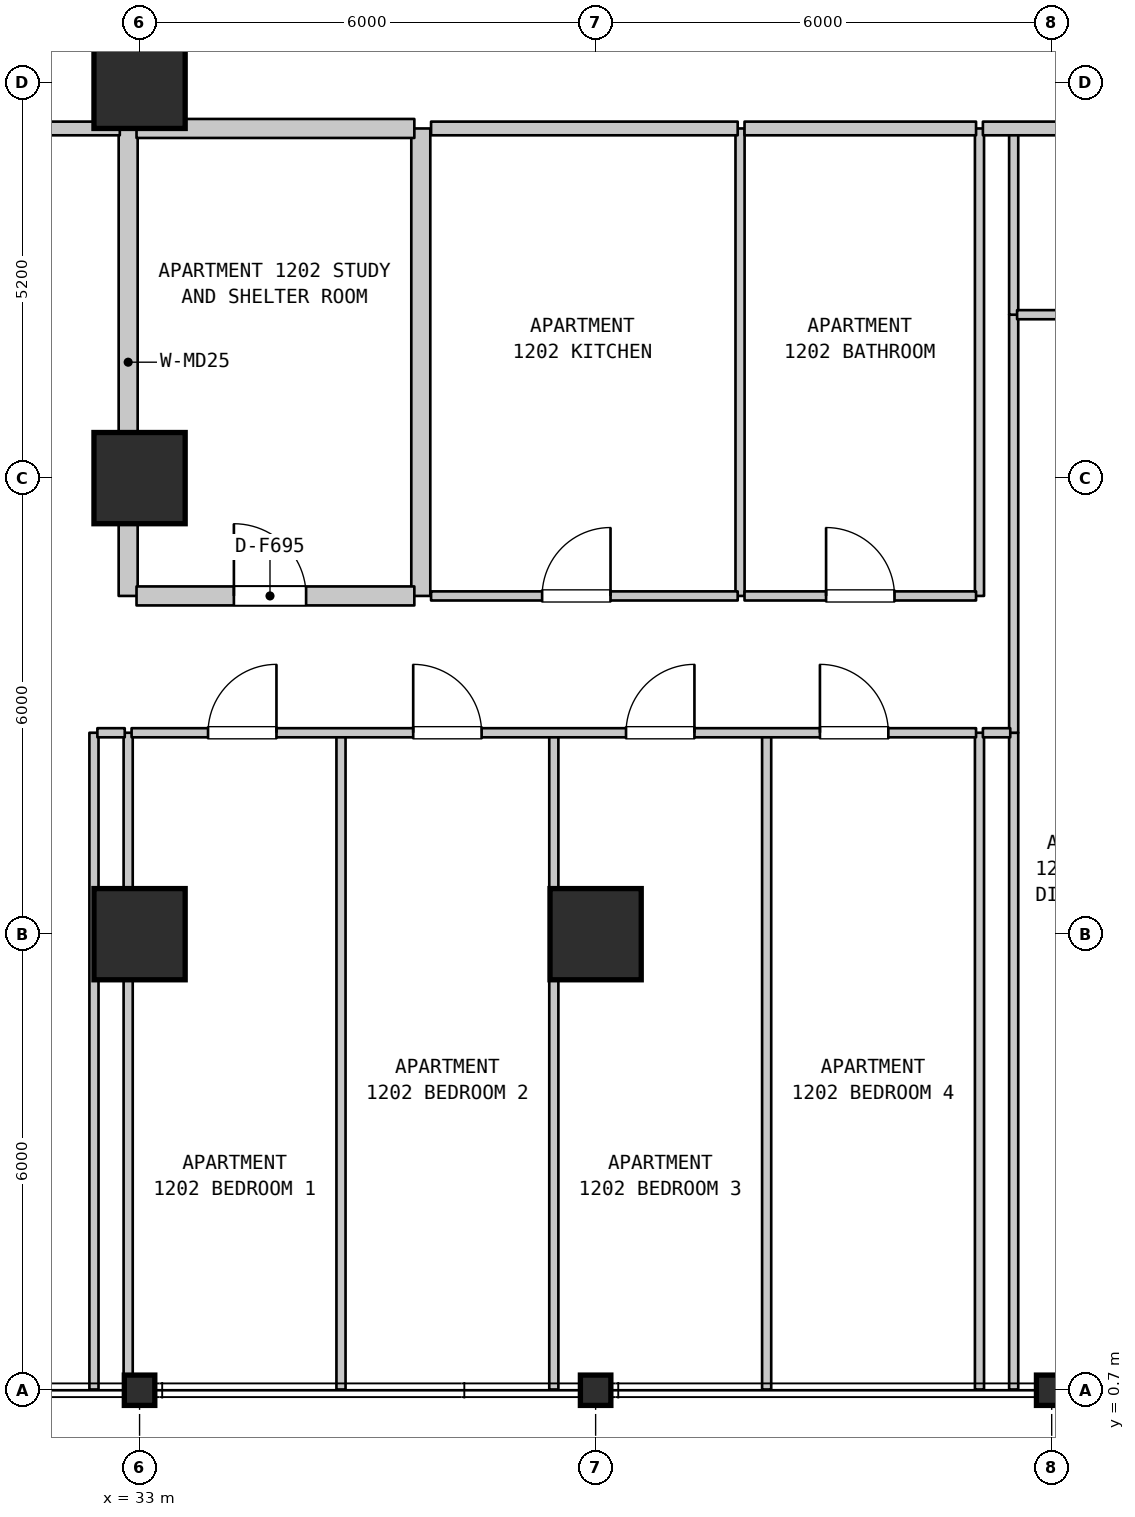
"""IFC4 building model, lengths in metres.
Left out: names, types, materials, properties, quantities, classifications, styles, units other than length and angle.
Written with IfcOpenShell. Run it as: python <this file> out.ifc"""

import sys

from ifc_helpers import new_model, si_unit, direction, frame, frame_2d, origin, origin_2d, place, context, subcontext, project, spatial, rectangle, i_section, extrude, element, fill, save


model = new_model("IFC4")
c1 = context("Model", 3, precision=1e-05, world=origin(), true_north=direction((0.0, 1.0)))
c2 = subcontext(c1, "Body", "Model", "MODEL_VIEW")
j1 = project(units=[si_unit("LENGTHUNIT", "METRE"), si_unit("PLANEANGLEUNIT", "RADIAN")], contexts=[c1])
p1 = place(None, origin())
s1 = spatial("IfcSite", under=j1, at=p1, CompositionType="ELEMENT")
p2 = place(p1, origin())
s2 = spatial("IfcBuilding", under=s1, at=p2, CompositionType="ELEMENT")
p3 = place(p2, frame((0.0, 0.0, 53.6)))
s3 = spatial("IfcBuildingStorey", under=s2, at=p3, CompositionType="ELEMENT", Elevation=53.6)
p4 = place(p3, frame((33.0, 0.7, 0.0), z_axis=(0.0, 0.0, 1.0), x_axis=(1.0, 0.0, 0.0)))
e1 = element("IfcColumn", 1, at=p4, inside=s3, PredefinedType="COLUMN", context=c2, shape_type="SweptSolid", body=[
    extrude(i_section(OverallWidth=0.401, OverallDepth=0.399, WebThickness=0.025, FlangeThickness=0.04, FilletRadius=0.015, at=origin_2d()), origin(), (0.0, 0.0, 1.0), 3.7),
])
for number, where, z_axis, x_axis in (
    (2, (33.0, 6.7, 0.0), (0.0, 0.0, 1.0), (1.0, 0.0, 0.0)),
    (3, (33.0, 12.7, 0.0), (0.0, 0.0, 1.0), (1.0, 0.0, 0.0)),
    (4, (33.0, 17.9, 0.0), (0.0, 0.0, 1.0), (1.0, 0.0, 0.0)),
):
    element("IfcColumn", number, at=place(p3, frame(where, z_axis=z_axis, x_axis=x_axis)), inside=s3, PredefinedType="COLUMN", context=c2, shape_type="SweptSolid", body=[
        extrude(rectangle(XDim=1.2, YDim=1.2, at=origin_2d()), origin(), (0.0, 0.0, 1.0), 3.7),
    ])
p5 = place(p3, frame((39.0, 0.7, 0.0), z_axis=(0.0, 0.0, 1.0), x_axis=(1.0, 0.0, 0.0)))
e5 = element("IfcColumn", 5, at=p5, inside=s3, PredefinedType="COLUMN", context=c2, shape_type="SweptSolid", body=[
    extrude(i_section(OverallWidth=0.401, OverallDepth=0.399, WebThickness=0.025, FlangeThickness=0.04, FilletRadius=0.015, at=origin_2d()), origin(), (0.0, 0.0, 1.0), 3.7),
])
p6 = place(p3, frame((39.0, 6.7, 0.0), z_axis=(0.0, 0.0, 1.0), x_axis=(1.0, 0.0, 0.0)))
e6 = element("IfcColumn", 6, at=p6, inside=s3, PredefinedType="COLUMN", context=c2, shape_type="SweptSolid", body=[
    extrude(rectangle(XDim=1.2, YDim=1.2, at=origin_2d()), origin(), (0.0, 0.0, 1.0), 3.7),
])
p7 = place(p3, frame((45.0, 0.7, 0.0), z_axis=(0.0, 0.0, 1.0), x_axis=(1.0, 0.0, 0.0)))
e7 = element("IfcColumn", 7, at=p7, inside=s3, PredefinedType="COLUMN", context=c2, shape_type="SweptSolid", body=[
    extrude(i_section(OverallWidth=0.401, OverallDepth=0.399, WebThickness=0.025, FlangeThickness=0.04, FilletRadius=0.015, at=origin_2d()), origin(), (0.0, 0.0, 1.0), 3.7),
])
for number, where, z_axis, x_axis in (
    (8, (32.4, 0.71, 0.0), (0.0, 0.0, 1.0), (0.0, 1.0, 0.0)),
    (9, (32.85, 0.71, 0.0), (0.0, 0.0, 1.0), (0.0, 1.0, 0.0)),
):
    element("IfcWall", number, at=place(p3, frame(where, z_axis=z_axis, x_axis=x_axis)), inside=s3, PredefinedType="PARTITIONING", context=c2, shape_type="SweptSolid", body=[
        extrude(rectangle(XDim=8.64, YDim=0.12, at=frame_2d((4.32, 0.0))), origin(), (0.0, 0.0, 1.0), 3.385),
    ])
p8 = place(p3, frame((32.85, 11.15, 0.0), z_axis=(0.0, 0.0, 1.0), x_axis=(0.0, 1.0, 0.0)))
e10 = element("IfcWall", 10, at=p8, inside=s3, PredefinedType="STANDARD", context=c2, shape_type="SweptSolid", body=[
    extrude(rectangle(XDim=6.15, YDim=0.25, at=frame_2d((3.075, 0.0))), origin(), (0.0, 0.0, 1.0), 3.385),
])
p9 = place(p3, frame((35.65, 0.71, 0.0), z_axis=(0.0, 0.0, 1.0), x_axis=(0.0, 1.0, 0.0)))
e11 = element("IfcWall", 11, at=p9, inside=s3, PredefinedType="PARTITIONING", context=c2, shape_type="SweptSolid", body=[
    extrude(rectangle(XDim=8.64, YDim=0.12, at=frame_2d((4.32, 0.0))), origin(), (0.0, 0.0, 1.0), 3.385),
])
p10 = place(p3, frame((36.7, 11.15, 0.0), z_axis=(0.0, 0.0, 1.0), x_axis=(0.0, 1.0, 0.0)))
e12 = element("IfcWall", 12, at=p10, inside=s3, PredefinedType="STANDARD", context=c2, shape_type="SweptSolid", body=[
    extrude(rectangle(XDim=6.15, YDim=0.25, at=frame_2d((3.075, 0.0))), origin(), (0.0, 0.0, 1.0), 3.385),
])
p11 = place(p3, frame((38.45, 0.71, 0.0), z_axis=(0.0, 0.0, 1.0), x_axis=(0.0, 1.0, 0.0)))
e13 = element("IfcWall", 13, at=p11, inside=s3, PredefinedType="PARTITIONING", context=c2, shape_type="SweptSolid", body=[
    extrude(rectangle(XDim=8.64, YDim=0.12, at=frame_2d((4.32, 0.0))), origin(), (0.0, 0.0, 1.0), 3.385),
])
p12 = place(p3, frame((40.9, 11.15, 0.0), z_axis=(0.0, 0.0, 1.0), x_axis=(0.0, 1.0, 0.0)))
e14 = element("IfcWall", 14, at=p12, inside=s3, PredefinedType="PARTITIONING", context=c2, shape_type="SweptSolid", body=[
    extrude(rectangle(XDim=6.15, YDim=0.12, at=frame_2d((3.075, 0.0))), origin(), (0.0, 0.0, 1.0), 3.385),
])
for number, where, z_axis, x_axis in (
    (15, (41.25, 0.71, 0.0), (0.0, 0.0, 1.0), (0.0, 1.0, 0.0)),
    (16, (44.05, 0.71, 0.0), (0.0, 0.0, 1.0), (0.0, 1.0, 0.0)),
):
    element("IfcWall", number, at=place(p3, frame(where, z_axis=z_axis, x_axis=x_axis)), inside=s3, PredefinedType="PARTITIONING", context=c2, shape_type="SweptSolid", body=[
        extrude(rectangle(XDim=8.64, YDim=0.12, at=frame_2d((4.32, 0.0))), origin(), (0.0, 0.0, 1.0), 3.385),
    ])
p13 = place(p3, frame((44.05, 11.15, 0.0), z_axis=(0.0, 0.0, 1.0), x_axis=(0.0, 1.0, 0.0)))
e17 = element("IfcWall", 17, at=p13, inside=s3, PredefinedType="PARTITIONING", context=c2, shape_type="SweptSolid", body=[
    extrude(rectangle(XDim=6.15, YDim=0.12, at=frame_2d((3.075, 0.0))), origin(), (0.0, 0.0, 1.0), 3.385),
])
p14 = place(p3, frame((44.5, 0.71, 0.0), z_axis=(0.0, 0.0, 1.0), x_axis=(0.0, 1.0, 0.0)))
e18 = element("IfcWall", 18, at=p14, inside=s3, PredefinedType="PARTITIONING", context=c2, shape_type="SweptSolid", body=[
    extrude(rectangle(XDim=8.64, YDim=0.12, at=frame_2d((4.32, 0.0))), origin(), (0.0, 0.0, 1.0), 3.385),
])
p15 = place(p3, frame((44.5, 9.35, 0.0), z_axis=(0.0, 0.0, 1.0), x_axis=(0.0, 1.0, 0.0)))
e19 = element("IfcWall", 19, at=p15, inside=s3, PredefinedType="PARTITIONING", context=c2, shape_type="SweptSolid", body=[
    extrude(rectangle(XDim=5.5, YDim=0.12, at=frame_2d((2.75, 0.0))), origin(), (0.0, 0.0, 1.0), 3.385),
])
p16 = place(p3, frame((44.5, 14.85, 0.0), z_axis=(0.0, 0.0, 1.0), x_axis=(0.0, 1.0, 0.0)))
e20 = element("IfcWall", 20, at=p16, inside=s3, PredefinedType="PARTITIONING", context=c2, shape_type="SweptSolid", body=[
    extrude(rectangle(XDim=2.45, YDim=0.12, at=frame_2d((1.225, 0.0))), origin(), (0.0, 0.0, 1.0), 3.385),
])
p17 = place(p3, frame((32.445, 9.35, 0.0), z_axis=(0.0, 0.0, 1.0), x_axis=(1.0, 0.0, 0.0)))
e21 = element("IfcWall", 21, at=p17, inside=s3, PredefinedType="PARTITIONING", context=c2, shape_type="SweptSolid", body=[
    extrude(rectangle(XDim=0.36, YDim=0.12, at=frame_2d((0.18, 0.0))), origin(), (0.0, 0.0, 1.0), 3.385),
])
p18 = place(p3, frame((32.895, 9.35, 0.0), z_axis=(0.0, 0.0, 1.0), x_axis=(1.0, 0.0, 0.0)))
e22 = element("IfcWall", 22, at=p18, inside=s3, PredefinedType="PARTITIONING", context=c2, shape_type="SweptSolid", body=[
    extrude(rectangle(XDim=11.11, YDim=0.12, at=frame_2d((5.555, 0.0))), origin(), (0.0, 0.0, 1.0), 3.385),
])
p19 = place(p18, frame((1.006, 0.0, 0.0)))
e23 = element("IfcOpeningElement", 23, at=p19, cuts=e22, PredefinedType="OPENING", context=c2, shape_type="SweptSolid", body=[
    extrude(rectangle(XDim=0.9, YDim=2.15, at=frame_2d((0.45, 1.075))), frame((0.0, 0.07, 0.0), z_axis=(0.0, -1.0, 0.0), x_axis=(1.0, 0.0, 0.0)), (0.0, 0.0, 1.0), 0.14),
])
p20 = place(p18, frame((3.705, 0.0, 0.0)))
e24 = element("IfcOpeningElement", 24, at=p20, cuts=e22, PredefinedType="OPENING", context=c2, shape_type="SweptSolid", body=[
    extrude(rectangle(XDim=0.9, YDim=2.15, at=frame_2d((0.45, 1.075))), frame((0.0, 0.07, 0.0), z_axis=(0.0, -1.0, 0.0), x_axis=(1.0, 0.0, 0.0)), (0.0, 0.0, 1.0), 0.14),
])
p21 = place(p18, frame((6.505, 0.0, 0.0)))
e25 = element("IfcOpeningElement", 25, at=p21, cuts=e22, PredefinedType="OPENING", context=c2, shape_type="SweptSolid", body=[
    extrude(rectangle(XDim=0.9, YDim=2.15, at=frame_2d((0.45, 1.075))), frame((0.0, 0.07, 0.0), z_axis=(0.0, -1.0, 0.0), x_axis=(1.0, 0.0, 0.0)), (0.0, 0.0, 1.0), 0.14),
])
p22 = place(p18, frame((9.056, 0.0, 0.0)))
e26 = element("IfcOpeningElement", 26, at=p22, cuts=e22, PredefinedType="OPENING", context=c2, shape_type="SweptSolid", body=[
    extrude(rectangle(XDim=0.9, YDim=2.15, at=frame_2d((0.45, 1.075))), frame((0.0, 0.07, 0.0), z_axis=(0.0, -1.0, 0.0), x_axis=(1.0, 0.0, 0.0)), (0.0, 0.0, 1.0), 0.14),
])
p23 = place(p3, frame((44.095, 9.35, 0.0), z_axis=(0.0, 0.0, 1.0), x_axis=(1.0, 0.0, 0.0)))
e27 = element("IfcWall", 27, at=p23, inside=s3, PredefinedType="PARTITIONING", context=c2, shape_type="SweptSolid", body=[
    extrude(rectangle(XDim=0.36, YDim=0.12, at=frame_2d((0.18, 0.0))), origin(), (0.0, 0.0, 1.0), 3.385),
])
p24 = place(p3, frame((32.96, 11.15, 0.0), z_axis=(0.0, 0.0, 1.0), x_axis=(1.0, 0.0, 0.0)))
e28 = element("IfcWall", 28, at=p24, inside=s3, PredefinedType="STANDARD", context=c2, shape_type="SweptSolid", body=[
    extrude(rectangle(XDim=3.655, YDim=0.25, at=frame_2d((1.828, 0.0))), origin(), (0.0, 0.0, 1.0), 3.385),
])
p25 = place(p24, frame((1.281, 0.0, 0.0)))
e29 = element("IfcOpeningElement", 29, at=p25, cuts=e28, PredefinedType="OPENING", context=c2, shape_type="SweptSolid", body=[
    extrude(rectangle(XDim=0.95, YDim=2.15, at=frame_2d((0.475, 1.075))), frame((0.0, 0.135, 0.0), z_axis=(0.0, -1.0, 0.0), x_axis=(1.0, 0.0, 0.0)), (0.0, 0.0, 1.0), 0.27),
])
p26 = place(p3, frame((36.835, 11.15, 0.0), z_axis=(0.0, 0.0, 1.0), x_axis=(1.0, 0.0, 0.0)))
e30 = element("IfcWall", 30, at=p26, inside=s3, PredefinedType="PARTITIONING", context=c2, shape_type="SweptSolid", body=[
    extrude(rectangle(XDim=4.034, YDim=0.12, at=frame_2d((2.017, 0.0))), origin(), (0.0, 0.0, 1.0), 3.385),
])
p27 = place(p26, frame((1.461, 0.0, 0.0)))
e31 = element("IfcOpeningElement", 31, at=p27, cuts=e30, PredefinedType="OPENING", context=c2, shape_type="SweptSolid", body=[
    extrude(rectangle(XDim=0.9, YDim=2.15, at=frame_2d((0.45, 1.075))), frame((0.0, 0.07, 0.0), z_axis=(0.0, -1.0, 0.0), x_axis=(1.0, 0.0, 0.0)), (0.0, 0.0, 1.0), 0.14),
])
p28 = place(p3, frame((40.959, 11.15, 0.0), z_axis=(0.0, 0.0, 1.0), x_axis=(1.0, 0.0, 0.0)))
e32 = element("IfcWall", 32, at=p28, inside=s3, PredefinedType="PARTITIONING", context=c2, shape_type="SweptSolid", body=[
    extrude(rectangle(XDim=3.046, YDim=0.12, at=frame_2d((1.523, 0.0))), origin(), (0.0, 0.0, 1.0), 3.385),
])
p29 = place(p28, frame((1.073, 0.0, 0.0)))
e33 = element("IfcOpeningElement", 33, at=p29, cuts=e32, PredefinedType="OPENING", context=c2, shape_type="SweptSolid", body=[
    extrude(rectangle(XDim=0.9, YDim=2.1, at=frame_2d((0.45, 1.05))), frame((0.0, 0.07, 0.0), z_axis=(0.0, -1.0, 0.0), x_axis=(1.0, 0.0, 0.0)), (0.0, 0.0, 1.0), 0.14),
])
p30 = place(p3, frame((44.545, 14.85, 0.0), z_axis=(0.0, 0.0, 1.0), x_axis=(1.0, 0.0, 0.0)))
e34 = element("IfcWall", 34, at=p30, inside=s3, PredefinedType="PARTITIONING", context=c2, shape_type="SweptSolid", body=[
    extrude(rectangle(XDim=2.16, YDim=0.12, at=frame_2d((1.08, 0.0))), origin(), (0.0, 0.0, 1.0), 3.385),
])
p31 = place(p30, frame((0.553, 0.0, 0.0)))
e35 = element("IfcOpeningElement", 35, at=p31, cuts=e34, PredefinedType="OPENING", context=c2, shape_type="SweptSolid", body=[
    extrude(rectangle(XDim=0.9, YDim=2.15, at=frame_2d((0.45, 1.075))), frame((0.0, 0.07, 0.0), z_axis=(0.0, -1.0, 0.0), x_axis=(1.0, 0.0, 0.0)), (0.0, 0.0, 1.0), 0.14),
])
p32 = place(p3, frame((27.645, 17.3, 0.0), z_axis=(0.0, 0.0, 1.0), x_axis=(1.0, 0.0, 0.0)))
e36 = element("IfcWall", 36, at=p32, inside=s3, PredefinedType="STANDARD", context=c2, shape_type="SweptSolid", body=[
    extrude(rectangle(XDim=5.095, YDim=0.18, at=frame_2d((2.547, 0.0))), origin(), (0.0, 0.0, 1.0), 3.385),
])
p33 = place(p32, frame((2.08, 0.0, 0.0)))
e37 = element("IfcOpeningElement", 37, at=p33, cuts=e36, PredefinedType="OPENING", context=c2, shape_type="SweptSolid", body=[
    extrude(rectangle(XDim=1.0, YDim=2.15, at=frame_2d((0.5, 1.075))), frame((0.0, 0.1, 0.0), z_axis=(0.0, -1.0, 0.0), x_axis=(1.0, 0.0, 0.0)), (0.0, 0.0, 1.0), 0.2),
])
p34 = place(p3, frame((32.96, 17.3, 0.0), z_axis=(0.0, 0.0, 1.0), x_axis=(1.0, 0.0, 0.0)))
e38 = element("IfcWall", 38, at=p34, inside=s3, PredefinedType="STANDARD", context=c2, shape_type="SweptSolid", body=[
    extrude(rectangle(XDim=3.655, YDim=0.25, at=frame_2d((1.828, 0.0))), origin(), (0.0, 0.0, 1.0), 3.385),
])
p35 = place(p3, frame((36.835, 17.3, 0.0), z_axis=(0.0, 0.0, 1.0), x_axis=(1.0, 0.0, 0.0)))
e39 = element("IfcWall", 39, at=p35, inside=s3, PredefinedType="STANDARD", context=c2, shape_type="SweptSolid", body=[
    extrude(rectangle(XDim=4.034, YDim=0.18, at=frame_2d((2.017, 0.0))), origin(), (0.0, 0.0, 1.0), 3.385),
])
p36 = place(p3, frame((40.959, 17.3, 0.0), z_axis=(0.0, 0.0, 1.0), x_axis=(1.0, 0.0, 0.0)))
e40 = element("IfcWall", 40, at=p36, inside=s3, PredefinedType="STANDARD", context=c2, shape_type="SweptSolid", body=[
    extrude(rectangle(XDim=3.046, YDim=0.18, at=frame_2d((1.523, 0.0))), origin(), (0.0, 0.0, 1.0), 3.385),
])
p37 = place(p3, frame((44.095, 17.3, 0.0), z_axis=(0.0, 0.0, 1.0), x_axis=(1.0, 0.0, 0.0)))
e41 = element("IfcWall", 41, at=p37, inside=s3, PredefinedType="STANDARD", context=c2, shape_type="SweptSolid", body=[
    extrude(rectangle(XDim=5.545, YDim=0.18, at=frame_2d((2.772, 0.0))), origin(), (0.0, 0.0, 1.0), 3.385),
])
p38 = place(p37, frame((2.305, 0.0, 0.0)))
e42 = element("IfcOpeningElement", 42, at=p38, cuts=e41, PredefinedType="OPENING", context=c2, shape_type="SweptSolid", body=[
    extrude(rectangle(XDim=1.0, YDim=2.15, at=frame_2d((0.5, 1.075))), frame((0.0, 0.1, 0.0), z_axis=(0.0, -1.0, 0.0), x_axis=(1.0, 0.0, 0.0)), (0.0, 0.0, 1.0), 0.2),
])
p39 = place(p19, origin())
e43 = element("IfcDoor", 43, at=p39, inside=s3, OperationType="SINGLE_SWING_RIGHT", PredefinedType="DOOR", context=c2, shape_type="SweptSolid", body=[
    extrude(rectangle(XDim=0.9, YDim=2.15, at=frame_2d((0.45, 1.075))), frame((0.0, 0.025, 0.0), z_axis=(0.0, -1.0, 0.0), x_axis=(1.0, 0.0, 0.0)), (0.0, 0.0, 1.0), 0.05),
])
fill(e23, e43)
p40 = place(p20, origin())
e44 = element("IfcDoor", 44, at=p40, inside=s3, OperationType="SINGLE_SWING_LEFT", PredefinedType="DOOR", context=c2, shape_type="SweptSolid", body=[
    extrude(rectangle(XDim=0.9, YDim=2.15, at=frame_2d((0.45, 1.075))), frame((0.0, 0.025, 0.0), z_axis=(0.0, -1.0, 0.0), x_axis=(1.0, 0.0, 0.0)), (0.0, 0.0, 1.0), 0.05),
])
fill(e24, e44)
p41 = place(p21, origin())
e45 = element("IfcDoor", 45, at=p41, inside=s3, OperationType="SINGLE_SWING_RIGHT", PredefinedType="DOOR", context=c2, shape_type="SweptSolid", body=[
    extrude(rectangle(XDim=0.9, YDim=2.15, at=frame_2d((0.45, 1.075))), frame((0.0, 0.025, 0.0), z_axis=(0.0, -1.0, 0.0), x_axis=(1.0, 0.0, 0.0)), (0.0, 0.0, 1.0), 0.05),
])
fill(e25, e45)
p42 = place(p22, origin())
e46 = element("IfcDoor", 46, at=p42, inside=s3, OperationType="SINGLE_SWING_LEFT", PredefinedType="DOOR", context=c2, shape_type="SweptSolid", body=[
    extrude(rectangle(XDim=0.9, YDim=2.15, at=frame_2d((0.45, 1.075))), frame((0.0, 0.025, 0.0), z_axis=(0.0, -1.0, 0.0), x_axis=(1.0, 0.0, 0.0)), (0.0, 0.0, 1.0), 0.05),
])
fill(e26, e46)
p43 = place(p25, origin())
e47 = element("IfcDoor", 47, at=p43, inside=s3, OperationType="SINGLE_SWING_LEFT", PredefinedType="DOOR", context=c2, shape_type="SweptSolid", body=[
    extrude(rectangle(XDim=0.95, YDim=2.15, at=frame_2d((0.475, 1.075))), frame((0.0, 0.025, 0.0), z_axis=(0.0, -1.0, 0.0), x_axis=(1.0, 0.0, 0.0)), (0.0, 0.0, 1.0), 0.05),
])
fill(e29, e47)
p44 = place(p27, origin())
e48 = element("IfcDoor", 48, at=p44, inside=s3, OperationType="SINGLE_SWING_RIGHT", PredefinedType="DOOR", context=c2, shape_type="SweptSolid", body=[
    extrude(rectangle(XDim=0.9, YDim=2.15, at=frame_2d((0.45, 1.075))), frame((0.0, 0.025, 0.0), z_axis=(0.0, -1.0, 0.0), x_axis=(1.0, 0.0, 0.0)), (0.0, 0.0, 1.0), 0.05),
])
fill(e31, e48)
p45 = place(p29, origin())
e49 = element("IfcDoor", 49, at=p45, inside=s3, OperationType="SINGLE_SWING_LEFT", PredefinedType="DOOR", context=c2, shape_type="SweptSolid", body=[
    extrude(rectangle(XDim=0.9, YDim=2.1, at=frame_2d((0.45, 1.05))), frame((0.0, 0.025, 0.0), z_axis=(0.0, -1.0, 0.0), x_axis=(1.0, 0.0, 0.0)), (0.0, 0.0, 1.0), 0.05),
])
fill(e33, e49)
save(model, sys.argv[1])
